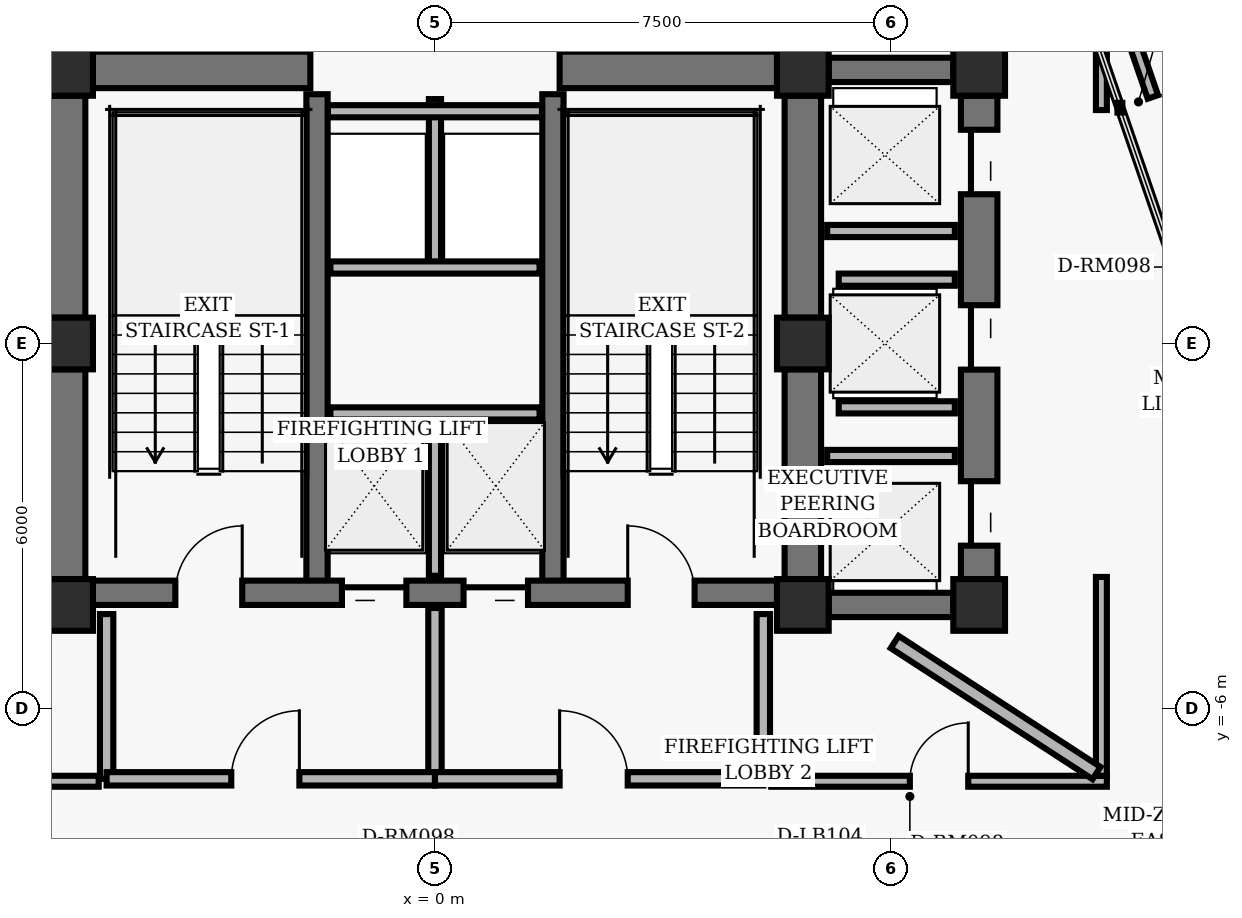
"""IFC4 building model, lengths in metres.
Left out: names, types, materials, properties, quantities, classifications, styles, units other than length and angle.
Written with IfcOpenShell. Run it as: python <this file> out.ifc"""

import sys

from ifc_helpers import new_model, si_unit, direction, frame, frame_2d, origin, origin_2d, place, context, subcontext, project, spatial, rectangle, hollow_rectangle, extrude, element, fill, save


model = new_model("IFC4")
c1 = context("Model", 3, precision=1e-05, world=origin(), true_north=direction((0.0, 1.0)))
c2 = subcontext(c1, "Body", "Model", "MODEL_VIEW")
j1 = project(units=[si_unit("LENGTHUNIT", "METRE"), si_unit("PLANEANGLEUNIT", "RADIAN")], contexts=[c1])
p1 = place(None, origin())
s1 = spatial("IfcSite", under=j1, at=p1, CompositionType="ELEMENT")
p2 = place(p1, origin())
s2 = spatial("IfcBuilding", under=s1, at=p2, CompositionType="ELEMENT")
p3 = place(p2, frame((0.0, 0.0, 156.32)))
s3 = spatial("IfcBuildingStorey", under=s2, at=p3, CompositionType="ELEMENT", Elevation=156.32)
for number, where, z_axis, x_axis in (
    (1, (-6.05, 4.5, 0.0), (0.0, 0.0, 1.0), (1.0, 0.0, 0.0)),
    (2, (6.05, 4.5, 0.0), (0.0, 0.0, 1.0), (1.0, 0.0, 0.0)),
    (3, (-6.05, 0.0, 0.0), (0.0, 0.0, 1.0), (1.0, 0.0, 0.0)),
    (4, (6.05, 0.0, 0.0), (0.0, 0.0, 1.0), (1.0, 0.0, 0.0)),
    (5, (-6.05, -4.3, 0.0), (0.0, 0.0, 1.0), (1.0, 0.0, 0.0)),
    (6, (6.05, -4.3, 0.0), (0.0, 0.0, 1.0), (1.0, 0.0, 0.0)),
    (7, (8.95, 4.5, 0.0), (0.0, 0.0, 1.0), (1.0, 0.0, 0.0)),
    (8, (8.95, -4.3, 0.0), (0.0, 0.0, 1.0), (1.0, 0.0, 0.0)),
):
    element("IfcColumn", number, at=place(p3, frame(where, z_axis=z_axis, x_axis=x_axis)), inside=s3, PredefinedType="COLUMN", context=c2, shape_type="SweptSolid", body=[
        extrude(hollow_rectangle(XDim=0.85, YDim=0.85, WallThickness=0.055, InnerFilletRadius=0.02, OuterFilletRadius=0.04, at=origin_2d()), origin(), (0.0, 0.0, 1.0), 3.04),
    ])
p4 = place(p3, frame((-6.05, 0.425, 0.0), z_axis=(0.0, 0.0, 1.0), x_axis=(0.0, 1.0, 0.0)))
e9 = element("IfcWall", 9, at=p4, inside=s3, PredefinedType="SHEAR", context=c2, shape_type="SweptSolid", body=[
    extrude(rectangle(XDim=3.65, YDim=0.6, at=frame_2d((1.825, 0.0))), origin(), (0.0, 0.0, 1.0), 2.788),
])
p5 = place(p3, frame((-6.05, -3.875, 0.0), z_axis=(0.0, 0.0, 1.0), x_axis=(0.0, 1.0, 0.0)))
e10 = element("IfcWall", 10, at=p5, inside=s3, PredefinedType="SHEAR", context=c2, shape_type="SweptSolid", body=[
    extrude(rectangle(XDim=3.45, YDim=0.6, at=frame_2d((1.725, 0.0))), origin(), (0.0, 0.0, 1.0), 2.788),
])
p6 = place(p3, frame((6.05, 0.425, 0.0), z_axis=(0.0, 0.0, 1.0), x_axis=(0.0, 1.0, 0.0)))
e11 = element("IfcWall", 11, at=p6, inside=s3, PredefinedType="SHEAR", context=c2, shape_type="SweptSolid", body=[
    extrude(rectangle(XDim=3.65, YDim=0.6, at=frame_2d((1.825, 0.0))), origin(), (0.0, 0.0, 1.0), 2.788),
])
p7 = place(p3, frame((6.05, -3.875, 0.0), z_axis=(0.0, 0.0, 1.0), x_axis=(0.0, 1.0, 0.0)))
e12 = element("IfcWall", 12, at=p7, inside=s3, PredefinedType="SHEAR", context=c2, shape_type="SweptSolid", body=[
    extrude(rectangle(XDim=3.45, YDim=0.6, at=frame_2d((1.725, 0.0))), origin(), (0.0, 0.0, 1.0), 2.788),
])
for number, where, z_axis, x_axis in (
    (13, (-1.94, -4.1, 0.0), (0.0, 0.0, 1.0), (0.0, 1.0, 0.0)),
    (14, (1.94, -4.1, 0.0), (0.0, 0.0, 1.0), (0.0, 1.0, 0.0)),
):
    element("IfcWall", number, at=place(p3, frame(where, z_axis=z_axis, x_axis=x_axis)), inside=s3, PredefinedType="SHEAR", context=c2, shape_type="SweptSolid", body=[
        extrude(rectangle(XDim=8.2, YDim=0.35, at=frame_2d((4.1, 0.0))), origin(), (0.0, 0.0, 1.0), 2.788),
    ])
p8 = place(p3, frame((-5.625, -4.1, 0.0), z_axis=(0.0, 0.0, 1.0), x_axis=(1.0, 0.0, 0.0)))
e15 = element("IfcWall", 15, at=p8, inside=s3, PredefinedType="SHEAR", context=c2, shape_type="SweptSolid", body=[
    extrude(rectangle(XDim=11.25, YDim=0.4, at=frame_2d((5.625, 0.0))), origin(), (0.0, 0.0, 1.0), 2.788),
])
p9 = place(p8, frame((1.355, 0.0, 0.0)))
e16 = element("IfcOpeningElement", 16, at=p9, cuts=e15, PredefinedType="OPENING", context=c2, shape_type="SweptSolid", body=[
    extrude(rectangle(XDim=1.1, YDim=2.04, at=frame_2d((0.55, 1.02))), frame((0.0, 0.21, 0.0), z_axis=(0.0, -1.0, 0.0), x_axis=(1.0, 0.0, 0.0)), (0.0, 0.0, 1.0), 0.42),
])
p10 = place(p8, frame((8.795, 0.0, 0.0)))
e17 = element("IfcOpeningElement", 17, at=p10, cuts=e15, PredefinedType="OPENING", context=c2, shape_type="SweptSolid", body=[
    extrude(rectangle(XDim=1.1, YDim=2.04, at=frame_2d((0.55, 1.02))), frame((0.0, 0.21, 0.0), z_axis=(0.0, -1.0, 0.0), x_axis=(1.0, 0.0, 0.0)), (0.0, 0.0, 1.0), 0.42),
])
p11 = place(p8, frame((4.095, 0.0, 0.0)))
e18 = element("IfcOpeningElement", 18, at=p11, cuts=e15, PredefinedType="OPENING", context=c2, shape_type="SweptSolid", body=[
    extrude(rectangle(XDim=1.06, YDim=2.04, at=frame_2d((0.53, 1.02))), frame((0.0, 0.21, 0.0), z_axis=(0.0, -1.0, 0.0), x_axis=(1.0, 0.0, 0.0)), (0.0, 0.0, 1.0), 0.42),
])
p12 = place(p8, frame((6.095, 0.0, 0.0)))
e19 = element("IfcOpeningElement", 19, at=p12, cuts=e15, PredefinedType="OPENING", context=c2, shape_type="SweptSolid", body=[
    extrude(rectangle(XDim=1.06, YDim=2.04, at=frame_2d((0.53, 1.02))), frame((0.0, 0.21, 0.0), z_axis=(0.0, -1.0, 0.0), x_axis=(1.0, 0.0, 0.0)), (0.0, 0.0, 1.0), 0.42),
])
for number, where, z_axis, x_axis in (
    (20, (-5.625, 4.5, 0.0), (0.0, 0.0, 1.0), (1.0, 0.0, 0.0)),
    (21, (2.05, 4.5, 0.0), (0.0, 0.0, 1.0), (1.0, 0.0, 0.0)),
):
    element("IfcWall", number, at=place(p3, frame(where, z_axis=z_axis, x_axis=x_axis)), inside=s3, PredefinedType="SHEAR", context=c2, shape_type="SweptSolid", body=[
        extrude(rectangle(XDim=3.575, YDim=0.6, at=frame_2d((1.788, 0.0))), origin(), (0.0, 0.0, 1.0), 2.788),
    ])
p13 = place(p3, frame((8.95, -3.875, 0.0), z_axis=(0.0, 0.0, 1.0), x_axis=(0.0, 1.0, 0.0)))
e22 = element("IfcWall", 22, at=p13, inside=s3, PredefinedType="SHEAR", context=c2, shape_type="SweptSolid", body=[
    extrude(rectangle(XDim=7.95, YDim=0.6, at=frame_2d((3.975, 0.0))), origin(), (0.0, 0.0, 1.0), 2.788),
])
p14 = place(p13, frame((0.55, 0.0, 0.0)))
e23 = element("IfcOpeningElement", 23, at=p14, cuts=e22, PredefinedType="OPENING", context=c2, shape_type="SweptSolid", body=[
    extrude(rectangle(XDim=1.06, YDim=2.04, at=frame_2d((0.53, 1.02))), frame((0.0, 0.31, 0.0), z_axis=(0.0, -1.0, 0.0), x_axis=(1.0, 0.0, 0.0)), (0.0, 0.0, 1.0), 0.62),
])
p15 = place(p13, frame((3.445, 0.0, 0.0)))
e24 = element("IfcOpeningElement", 24, at=p15, cuts=e22, PredefinedType="OPENING", context=c2, shape_type="SweptSolid", body=[
    extrude(rectangle(XDim=1.06, YDim=2.04, at=frame_2d((0.53, 1.02))), frame((0.0, 0.31, 0.0), z_axis=(0.0, -1.0, 0.0), x_axis=(1.0, 0.0, 0.0)), (0.0, 0.0, 1.0), 0.62),
])
p16 = place(p13, frame((6.33, 0.0, 0.0)))
e25 = element("IfcOpeningElement", 25, at=p16, cuts=e22, PredefinedType="OPENING", context=c2, shape_type="SweptSolid", body=[
    extrude(rectangle(XDim=1.06, YDim=2.04, at=frame_2d((0.53, 1.02))), frame((0.0, 0.31, 0.0), z_axis=(0.0, -1.0, 0.0), x_axis=(1.0, 0.0, 0.0)), (0.0, 0.0, 1.0), 0.62),
])
for number, where, z_axis, x_axis in (
    (26, (6.475, 4.5, 0.0), (0.0, 0.0, 1.0), (1.0, 0.0, 0.0)),
    (27, (6.475, -4.3, 0.0), (0.0, 0.0, 1.0), (1.0, 0.0, 0.0)),
):
    element("IfcWall", number, at=place(p3, frame(where, z_axis=z_axis, x_axis=x_axis)), inside=s3, PredefinedType="SHEAR", context=c2, shape_type="SweptSolid", body=[
        extrude(rectangle(XDim=2.05, YDim=0.4, at=frame_2d((1.025, 0.0))), origin(), (0.0, 0.0, 1.0), 2.788),
    ])
p17 = place(p3, frame((0.0, -3.82, 0.0), z_axis=(0.0, 0.0, 1.0), x_axis=(0.0, 1.0, 0.0)))
e28 = element("IfcWall", 28, at=p17, inside=s3, PredefinedType="PARTITIONING", context=c2, shape_type="SweptSolid", body=[
    extrude(rectangle(XDim=2.67, YDim=0.2, at=frame_2d((1.335, 0.0))), origin(), (0.0, 0.0, 1.0), 2.763),
])
p18 = place(p3, frame((-1.72, -1.15, 0.0), z_axis=(0.0, 0.0, 1.0), x_axis=(1.0, 0.0, 0.0)))
e29 = element("IfcWall", 29, at=p18, inside=s3, PredefinedType="PARTITIONING", context=c2, shape_type="SweptSolid", body=[
    extrude(rectangle(XDim=3.44, YDim=0.2, at=frame_2d((1.72, 0.0))), origin(), (0.0, 0.0, 1.0), 2.763),
])
for number, where, z_axis, x_axis in (
    (30, (-5.4, -7.16, 0.0), (0.0, 0.0, 1.0), (0.0, 1.0, 0.0)),
    (31, (5.4, -7.16, 0.0), (0.0, 0.0, 1.0), (0.0, 1.0, 0.0)),
):
    element("IfcWall", number, at=place(p3, frame(where, z_axis=z_axis, x_axis=x_axis)), inside=s3, PredefinedType="PARTITIONING", context=c2, shape_type="SweptSolid", body=[
        extrude(rectangle(XDim=2.71, YDim=0.22, at=frame_2d((1.355, 0.0))), origin(), (0.0, 0.0, 1.0), 2.763),
    ])
p19 = place(p3, frame((0.0, -7.16, 0.0), z_axis=(0.0, 0.0, 1.0), x_axis=(0.0, 1.0, 0.0)))
e32 = element("IfcWall", 32, at=p19, inside=s3, PredefinedType="PARTITIONING", context=c2, shape_type="SweptSolid", body=[
    extrude(rectangle(XDim=2.81, YDim=0.22, at=frame_2d((1.405, 0.0))), origin(), (0.0, 0.0, 1.0), 2.763),
])
p20 = place(p3, frame((-5.4, -7.16, 0.0), z_axis=(0.0, 0.0, 1.0), x_axis=(1.0, 0.0, 0.0)))
e33 = element("IfcWall", 33, at=p20, inside=s3, PredefinedType="PARTITIONING", context=c2, shape_type="SweptSolid", body=[
    extrude(rectangle(XDim=5.4, YDim=0.22, at=frame_2d((2.7, 0.0))), origin(), (0.0, 0.0, 1.0), 2.33),
])
p21 = place(p20, frame((2.05, 0.0, 0.0)))
e34 = element("IfcOpeningElement", 34, at=p21, cuts=e33, PredefinedType="OPENING", context=c2, shape_type="SweptSolid", body=[
    extrude(rectangle(XDim=1.12, YDim=2.02, at=frame_2d((0.56, 1.01))), frame((0.0, 0.12, 0.0), z_axis=(0.0, -1.0, 0.0), x_axis=(1.0, 0.0, 0.0)), (0.0, 0.0, 1.0), 0.24),
])
p22 = place(p3, frame((0.0, -7.16, 0.0), z_axis=(0.0, 0.0, 1.0), x_axis=(1.0, 0.0, 0.0)))
e35 = element("IfcWall", 35, at=p22, inside=s3, PredefinedType="PARTITIONING", context=c2, shape_type="SweptSolid", body=[
    extrude(rectangle(XDim=5.4, YDim=0.22, at=frame_2d((2.7, 0.0))), origin(), (0.0, 0.0, 1.0), 2.33),
])
p23 = place(p22, frame((2.05, 0.0, 0.0)))
e36 = element("IfcOpeningElement", 36, at=p23, cuts=e35, PredefinedType="OPENING", context=c2, shape_type="SweptSolid", body=[
    extrude(rectangle(XDim=1.12, YDim=2.02, at=frame_2d((0.56, 1.01))), frame((0.0, 0.12, 0.0), z_axis=(0.0, -1.0, 0.0), x_axis=(1.0, 0.0, 0.0)), (0.0, 0.0, 1.0), 0.24),
])
p24 = place(p3, frame((0.0, 1.25, 0.0), z_axis=(0.0, 0.0, 1.0), x_axis=(0.0, 1.0, 0.0)))
e37 = element("IfcWall", 37, at=p24, inside=s3, PredefinedType="PARTITIONING", context=c2, shape_type="SweptSolid", body=[
    extrude(rectangle(XDim=2.77, YDim=0.2, at=frame_2d((1.385, 0.0))), origin(), (0.0, 0.0, 1.0), 2.763),
])
p25 = place(p3, frame((-1.72, 1.25, 0.0), z_axis=(0.0, 0.0, 1.0), x_axis=(1.0, 0.0, 0.0)))
e38 = element("IfcWall", 38, at=p25, inside=s3, PredefinedType="PARTITIONING", context=c2, shape_type="SweptSolid", body=[
    extrude(rectangle(XDim=3.44, YDim=0.2, at=frame_2d((1.72, 0.0))), origin(), (0.0, 0.0, 1.0), 2.763),
])
p26 = place(p3, frame((-1.76, 3.82, 0.0), z_axis=(0.0, 0.0, 1.0), x_axis=(1.0, 0.0, 0.0)))
e39 = element("IfcWall", 39, at=p26, inside=s3, PredefinedType="PARTITIONING", context=c2, shape_type="SweptSolid", body=[
    extrude(rectangle(XDim=3.52, YDim=0.2, at=frame_2d((1.76, 0.0))), origin(), (0.0, 0.0, 1.0), 2.763),
])
for number, where, z_axis, x_axis in (
    (40, (6.45, -1.85, 0.0), (0.0, 0.0, 1.0), (1.0, 0.0, 0.0)),
    (41, (6.45, 1.85, 0.0), (0.0, 0.0, 1.0), (1.0, 0.0, 0.0)),
):
    element("IfcWall", number, at=place(p3, frame(where, z_axis=z_axis, x_axis=x_axis)), inside=s3, PredefinedType="PARTITIONING", context=c2, shape_type="SweptSolid", body=[
        extrude(rectangle(XDim=2.1, YDim=0.2, at=frame_2d((1.05, 0.0))), origin(), (0.0, 0.0, 1.0), 2.763),
    ])
for number, where, z_axis, x_axis in (
    (42, (6.64, -1.05, 0.0), (0.0, 0.0, 1.0), (1.0, 0.0, 0.0)),
    (43, (6.64, 1.05, 0.0), (0.0, 0.0, 1.0), (1.0, 0.0, 0.0)),
):
    element("IfcWall", number, at=place(p3, frame(where, z_axis=z_axis, x_axis=x_axis)), inside=s3, PredefinedType="PARTITIONING", context=c2, shape_type="SweptSolid", body=[
        extrude(rectangle(XDim=1.91, YDim=0.2, at=frame_2d((0.955, 0.0))), origin(), (0.0, 0.0, 1.0), 2.763),
    ])
p27 = place(p3, frame((-6.59, -7.2, 0.0), z_axis=(0.0, 0.0, 1.0), x_axis=(1.0, 0.0, 0.0)))
e44 = element("IfcWall", 44, at=p27, inside=s3, PredefinedType="PARTITIONING", context=c2, shape_type="SweptSolid", body=[
    extrude(rectangle(XDim=1.06, YDim=0.18, at=frame_2d((0.53, 0.0))), origin(), (0.0, 0.0, 1.0), 2.763),
])
p28 = place(p3, frame((5.53, -7.2, 0.0), z_axis=(0.0, 0.0, 1.0), x_axis=(1.0, 0.0, 0.0)))
e45 = element("IfcWall", 45, at=p28, inside=s3, PredefinedType="PARTITIONING", context=c2, shape_type="SweptSolid", body=[
    extrude(rectangle(XDim=5.52, YDim=0.18, at=frame_2d((2.76, 0.0))), origin(), (0.0, 0.0, 1.0), 2.33),
])
p29 = place(p28, frame((2.28, 0.0, 0.0)))
e46 = element("IfcOpeningElement", 46, at=p29, cuts=e45, PredefinedType="OPENING", context=c2, shape_type="SweptSolid", body=[
    extrude(rectangle(XDim=0.96, YDim=2.02, at=frame_2d((0.48, 1.01))), frame((0.0, 0.1, 0.0), z_axis=(0.0, -1.0, 0.0), x_axis=(1.0, 0.0, 0.0)), (0.0, 0.0, 1.0), 0.2),
])
p30 = place(p3, frame((10.96, -7.11, 0.0), z_axis=(0.0, 0.0, 1.0), x_axis=(0.0, 1.0, 0.0)))
e47 = element("IfcWall", 47, at=p30, inside=s3, PredefinedType="PARTITIONING", context=c2, shape_type="SweptSolid", body=[
    extrude(rectangle(XDim=3.271, YDim=0.18, at=frame_2d((1.635, 0.0))), origin(), (0.0, 0.0, 1.0), 2.763),
])
p31 = place(p3, frame((10.96, 3.84, 0.0), z_axis=(0.0, 0.0, 1.0), x_axis=(0.0, 1.0, 0.0)))
e48 = element("IfcWall", 48, at=p31, inside=s3, PredefinedType="PARTITIONING", context=c2, shape_type="SweptSolid", body=[
    extrude(rectangle(XDim=2.694, YDim=0.18, at=frame_2d((1.347, 0.0))), origin(), (0.0, 0.0, 1.0), 2.33),
])
p32 = place(p3, frame((10.954, 6.533, 0.0), z_axis=(0.0, 0.0, 1.0), x_axis=(0.325553439946, -0.945523642084, 0.0)))
e49 = element("IfcWall", 49, at=p32, inside=s3, PredefinedType="PARTITIONING", context=c2, shape_type="SweptSolid", body=[
    extrude(rectangle(XDim=11.22, YDim=0.18, at=frame_2d((5.61, 0.0))), origin(), (0.0, 0.0, 1.0), 2.763),
])
p33 = place(p32, frame((5.493, 0.0, 0.0)))
e50 = element("IfcOpeningElement", 50, at=p33, cuts=e49, PredefinedType="OPENING", context=c2, shape_type="SweptSolid", body=[
    extrude(rectangle(XDim=0.96, YDim=2.02, at=frame_2d((0.48, 1.01))), frame((0.0, 0.1, 0.0), z_axis=(0.0, -1.0, 0.0), x_axis=(1.0, 0.0, 0.0)), (0.0, 0.0, 1.0), 0.2),
])
p34 = place(p32, frame((2.621, 0.0, 0.0)))
e51 = element("IfcOpeningElement", 51, at=p34, cuts=e49, PredefinedType="OPENING", context=c2, shape_type="SweptSolid", body=[
    extrude(rectangle(XDim=0.96, YDim=2.02, at=frame_2d((0.48, 1.01))), frame((0.0, 0.1, 0.0), z_axis=(0.0, -1.0, 0.0), x_axis=(1.0, 0.0, 0.0)), (0.0, 0.0, 1.0), 0.2),
])
p35 = place(p3, frame((7.561, -4.91, 0.0), z_axis=(0.0, 0.0, 1.0), x_axis=(0.838633829817, -0.544695602595, 0.0)))
e52 = element("IfcWall", 52, at=p35, inside=s3, PredefinedType="PARTITIONING", context=c2, shape_type="SweptSolid", body=[
    extrude(rectangle(XDim=3.958, YDim=0.24, at=frame_2d((1.979, 0.0))), origin(), (0.0, 0.0, 1.0), 2.132),
])
p36 = place(p9, origin())
e53 = element("IfcDoor", 53, at=p36, inside=s3, OperationType="SINGLE_SWING_RIGHT", PredefinedType="DOOR", context=c2, shape_type="SweptSolid", body=[
    extrude(rectangle(XDim=1.1, YDim=2.04, at=frame_2d((0.55, 1.02))), frame((0.0, 0.025, 0.0), z_axis=(0.0, -1.0, 0.0), x_axis=(1.0, 0.0, 0.0)), (0.0, 0.0, 1.0), 0.05),
])
fill(e16, e53)
p37 = place(p10, origin())
e54 = element("IfcDoor", 54, at=p37, inside=s3, OperationType="SINGLE_SWING_LEFT", PredefinedType="DOOR", context=c2, shape_type="SweptSolid", body=[
    extrude(rectangle(XDim=1.1, YDim=2.04, at=frame_2d((0.55, 1.02))), frame((0.0, 0.025, 0.0), z_axis=(0.0, -1.0, 0.0), x_axis=(1.0, 0.0, 0.0)), (0.0, 0.0, 1.0), 0.05),
])
fill(e17, e54)
p38 = place(p11, origin())
e55 = element("IfcDoor", 55, at=p38, inside=s3, OperationType="SLIDING_TO_LEFT", PredefinedType="DOOR", context=c2, shape_type="SweptSolid", body=[
    extrude(rectangle(XDim=1.06, YDim=2.04, at=frame_2d((0.53, 1.02))), frame((0.0, 0.025, 0.0), z_axis=(0.0, -1.0, 0.0), x_axis=(1.0, 0.0, 0.0)), (0.0, 0.0, 1.0), 0.05),
])
fill(e18, e55)
p39 = place(p12, origin())
e56 = element("IfcDoor", 56, at=p39, inside=s3, OperationType="SLIDING_TO_RIGHT", PredefinedType="DOOR", context=c2, shape_type="SweptSolid", body=[
    extrude(rectangle(XDim=1.06, YDim=2.04, at=frame_2d((0.53, 1.02))), frame((0.0, 0.025, 0.0), z_axis=(0.0, -1.0, 0.0), x_axis=(1.0, 0.0, 0.0)), (0.0, 0.0, 1.0), 0.05),
])
fill(e19, e56)
p40 = place(p21, origin())
e57 = element("IfcDoor", 57, at=p40, inside=s3, OperationType="SINGLE_SWING_RIGHT", PredefinedType="DOOR", context=c2, shape_type="SweptSolid", body=[
    extrude(rectangle(XDim=1.12, YDim=2.02, at=frame_2d((0.56, 1.01))), frame((0.0, 0.025, 0.0), z_axis=(0.0, -1.0, 0.0), x_axis=(1.0, 0.0, 0.0)), (0.0, 0.0, 1.0), 0.05),
])
fill(e34, e57)
p41 = place(p23, origin())
e58 = element("IfcDoor", 58, at=p41, inside=s3, OperationType="SINGLE_SWING_LEFT", PredefinedType="DOOR", context=c2, shape_type="SweptSolid", body=[
    extrude(rectangle(XDim=1.12, YDim=2.02, at=frame_2d((0.56, 1.01))), frame((0.0, 0.025, 0.0), z_axis=(0.0, -1.0, 0.0), x_axis=(1.0, 0.0, 0.0)), (0.0, 0.0, 1.0), 0.05),
])
fill(e36, e58)
p42 = place(p14, origin())
e59 = element("IfcDoor", 59, at=p42, inside=s3, OperationType="SLIDING_TO_LEFT", PredefinedType="DOOR", context=c2, shape_type="SweptSolid", body=[
    extrude(rectangle(XDim=1.06, YDim=2.04, at=frame_2d((0.53, 1.02))), frame((0.0, 0.025, 0.0), z_axis=(0.0, -1.0, 0.0), x_axis=(1.0, 0.0, 0.0)), (0.0, 0.0, 1.0), 0.05),
])
fill(e23, e59)
p43 = place(p15, origin())
e60 = element("IfcDoor", 60, at=p43, inside=s3, OperationType="SLIDING_TO_RIGHT", PredefinedType="DOOR", context=c2, shape_type="SweptSolid", body=[
    extrude(rectangle(XDim=1.06, YDim=2.04, at=frame_2d((0.53, 1.02))), frame((0.0, 0.025, 0.0), z_axis=(0.0, -1.0, 0.0), x_axis=(1.0, 0.0, 0.0)), (0.0, 0.0, 1.0), 0.05),
])
fill(e24, e60)
p44 = place(p16, origin())
e61 = element("IfcDoor", 61, at=p44, inside=s3, OperationType="SLIDING_TO_LEFT", PredefinedType="DOOR", context=c2, shape_type="SweptSolid", body=[
    extrude(rectangle(XDim=1.06, YDim=2.04, at=frame_2d((0.53, 1.02))), frame((0.0, 0.025, 0.0), z_axis=(0.0, -1.0, 0.0), x_axis=(1.0, 0.0, 0.0)), (0.0, 0.0, 1.0), 0.05),
])
fill(e25, e61)
p45 = place(p29, origin())
e62 = element("IfcDoor", 62, at=p45, inside=s3, OperationType="SINGLE_SWING_RIGHT", PredefinedType="DOOR", context=c2, shape_type="SweptSolid", body=[
    extrude(rectangle(XDim=0.96, YDim=2.02, at=frame_2d((0.48, 1.01))), frame((0.0, 0.025, 0.0), z_axis=(0.0, -1.0, 0.0), x_axis=(1.0, 0.0, 0.0)), (0.0, 0.0, 1.0), 0.05),
])
fill(e46, e62)
p46 = place(p34, origin())
e63 = element("IfcDoor", 63, at=p46, inside=s3, OperationType="SINGLE_SWING_RIGHT", PredefinedType="DOOR", context=c2, shape_type="SweptSolid", body=[
    extrude(rectangle(XDim=0.96, YDim=2.02, at=frame_2d((0.48, 1.01))), frame((0.0, 0.025, 0.0), z_axis=(0.0, -1.0, 0.0), x_axis=(1.0, 0.0, 0.0)), (0.0, 0.0, 1.0), 0.05),
])
fill(e51, e63)
save(model, sys.argv[1])
